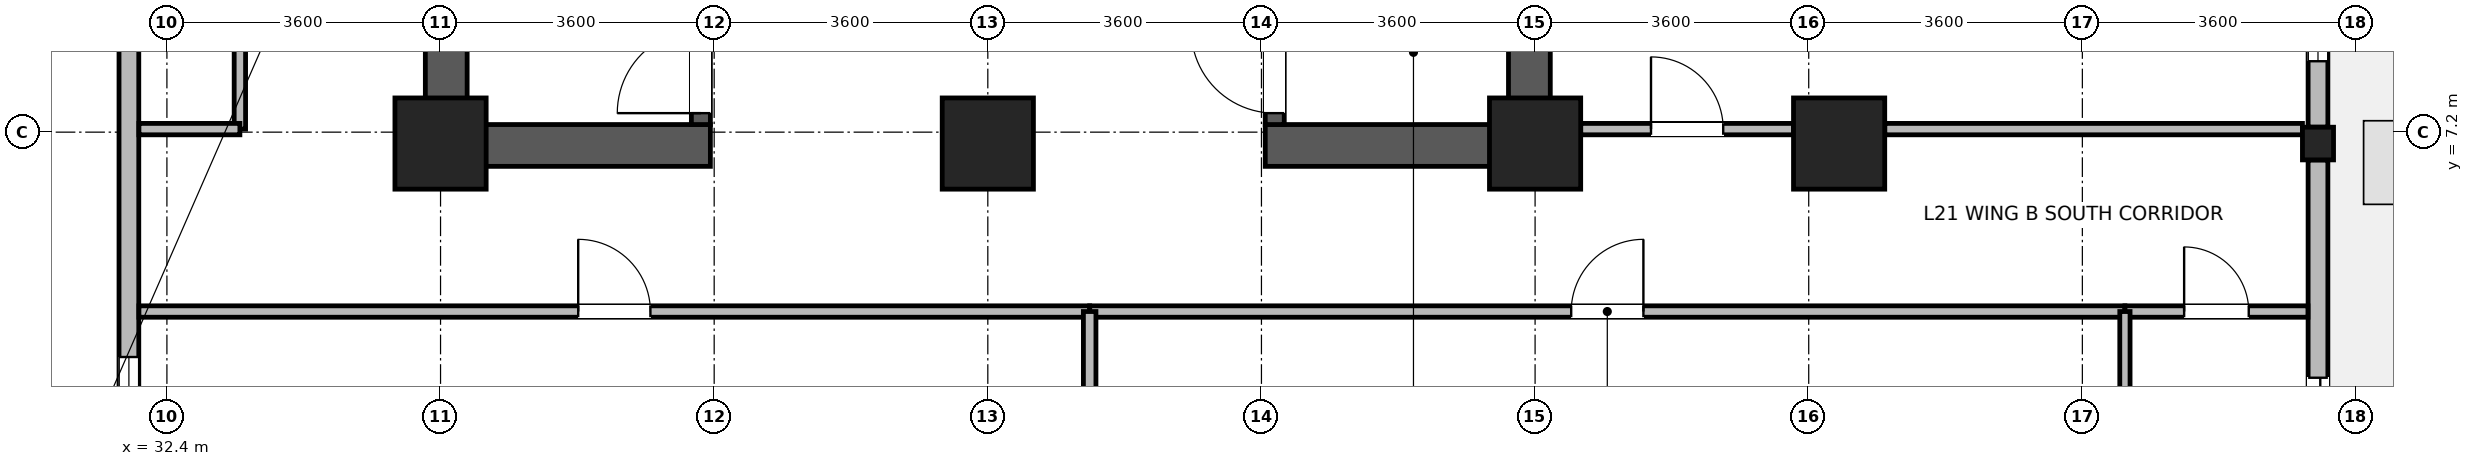
"""IFC4 building model, lengths in metres.
Left out: names, types, materials, properties, quantities, classifications, styles, units other than length and angle.
Written with IfcOpenShell. Run it as: python <this file> out.ifc"""

import sys

from ifc_helpers import new_model, si_unit, direction, frame, frame_2d, origin, origin_2d, place, context, subcontext, project, spatial, rectangle, i_section, extrude, source, transform, mapped, element, fill, save


model = new_model("IFC4")
c1 = context("Model", 3, precision=1e-05, world=origin(), true_north=direction((0.0, 1.0)))
c2 = subcontext(c1, "Body", "Model", "MODEL_VIEW")
j1 = project(units=[si_unit("LENGTHUNIT", "METRE"), si_unit("PLANEANGLEUNIT", "RADIAN")], contexts=[c1])
p1 = place(None, origin())
s1 = spatial("IfcSite", under=j1, at=p1, CompositionType="ELEMENT")
p2 = place(p1, origin())
s2 = spatial("IfcBuilding", under=s1, at=p2, CompositionType="ELEMENT")
p3 = place(p2, frame((0.0, 0.0, 86.0)))
s3 = spatial("IfcBuildingStorey", under=s2, at=p3, CompositionType="ELEMENT", Elevation=86.0)
for number, where, z_axis, x_axis in (
    (1, (36.075, 6.75, 0.0), (0.0, 0.0, 1.0), (0.0, 1.0, 0.0)),
    (2, (50.325, 6.75, 0.0), (0.0, 0.0, 1.0), (0.0, 1.0, 0.0)),
):
    element("IfcWall", number, at=place(p3, frame(where, z_axis=z_axis, x_axis=x_axis)), inside=s3, PredefinedType="SHEAR", context=c2, shape_type="SweptSolid", body=[
        extrude(rectangle(XDim=8.1, YDim=0.55, at=frame_2d((4.05, 0.0))), origin(), (0.0, 0.0, 1.0), 3.45),
    ])
for number, where, z_axis, x_axis in (
    (3, (36.35, 7.025, 0.0), (0.0, 0.0, 1.0), (1.0, 0.0, 0.0)),
    (4, (46.85, 7.025, 0.0), (0.0, 0.0, 1.0), (1.0, 0.0, 0.0)),
):
    element("IfcWall", number, at=place(p3, frame(where, z_axis=z_axis, x_axis=x_axis)), inside=s3, PredefinedType="SHEAR", context=c2, shape_type="SweptSolid", body=[
        extrude(rectangle(XDim=3.2, YDim=0.55, at=frame_2d((1.6, 0.0))), origin(), (0.0, 0.0, 1.0), 3.45),
    ])
p4 = place(p3, frame((39.425, 7.3, 0.0), z_axis=(0.0, 0.0, 1.0), x_axis=(0.0, 1.0, 0.0)))
e5 = element("IfcWall", 5, at=p4, inside=s3, PredefinedType="SHEAR", context=c2, shape_type="SweptSolid", body=[
    extrude(rectangle(XDim=7.0, YDim=0.25, at=frame_2d((3.5, 0.0))), origin(), (0.0, 0.0, 1.0), 3.45),
])
p5 = place(p4, frame((0.15, 0.0, 0.0)))
e6 = element("IfcOpeningElement", 6, at=p5, cuts=e5, PredefinedType="OPENING", context=c2, shape_type="SweptSolid", body=[
    extrude(rectangle(XDim=1.1, YDim=2.08, at=frame_2d((0.55, 1.04))), frame((0.0, 0.135, 0.0), z_axis=(0.0, -1.0, 0.0), x_axis=(1.0, 0.0, 0.0)), (0.0, 0.0, 1.0), 0.27),
])
p6 = place(p3, frame((46.975, 7.3, 0.0), z_axis=(0.0, 0.0, 1.0), x_axis=(0.0, 1.0, 0.0)))
e7 = element("IfcWall", 7, at=p6, inside=s3, PredefinedType="SHEAR", context=c2, shape_type="SweptSolid", body=[
    extrude(rectangle(XDim=7.0, YDim=0.25, at=frame_2d((3.5, 0.0))), origin(), (0.0, 0.0, 1.0), 3.45),
])
p7 = place(p6, frame((0.15, 0.0, 0.0)))
e8 = element("IfcOpeningElement", 8, at=p7, cuts=e7, PredefinedType="OPENING", context=c2, shape_type="SweptSolid", body=[
    extrude(rectangle(XDim=1.1, YDim=2.08, at=frame_2d((0.55, 1.04))), frame((0.0, 0.135, 0.0), z_axis=(0.0, -1.0, 0.0), x_axis=(1.0, 0.0, 0.0)), (0.0, 0.0, 1.0), 0.27),
])
m1 = source(origin(), c2, "Body", "SweptSolid", [
    extrude(rectangle(XDim=1.2, YDim=1.2, at=origin_2d()), origin(), (0.0, 0.0, 1.0), 3.7),
])
for number, where, z_axis, x_axis in (
    (9, (36.0, 7.05, 0.0), (0.0, 0.0, 1.0), (1.0, 0.0, 0.0)),
    (10, (43.2, 7.05, 0.0), (0.0, 0.0, 1.0), (1.0, 0.0, 0.0)),
    (11, (50.4, 7.05, 0.0), (0.0, 0.0, 1.0), (1.0, 0.0, 0.0)),
    (12, (54.4, 7.05, 0.0), (0.0, 0.0, 1.0), (1.0, 0.0, 0.0)),
):
    element("IfcColumn", number, at=place(p3, frame(where, z_axis=z_axis, x_axis=x_axis)), inside=s3, PredefinedType="COLUMN", context=c2, shape_type="MappedRepresentation", body=[
        mapped(m1, transform((0.0, 0.0, 0.0), x_axis=(1.0, 0.0, 0.0), y_axis=(0.0, 1.0, 0.0), z_axis=(0.0, 0.0, 1.0), scale=1.0)),
    ])
m2 = source(origin(), c2, "Body", "SweptSolid", [
    extrude(i_section(OverallWidth=0.409, OverallDepth=0.43, WebThickness=0.024, FlangeThickness=0.033, FilletRadius=0.015, at=origin_2d()), origin(), (0.0, 0.0, 1.0), 3.7),
])
p8 = place(p3, frame((60.7, 7.05, 0.0), z_axis=(0.0, 0.0, 1.0), x_axis=(1.0, 0.0, 0.0)))
e13 = element("IfcColumn", 13, at=p8, inside=s3, PredefinedType="COLUMN", context=c2, shape_type="MappedRepresentation", body=[
    mapped(m2, transform((0.0, 0.0, 0.0), x_axis=(1.0, 0.0, 0.0), y_axis=(0.0, 1.0, 0.0), z_axis=(0.0, 0.0, 1.0), scale=1.0)),
])
p9 = place(p3, frame((60.7, 6.834, 0.0), z_axis=(0.0, 0.0, 1.0), x_axis=(0.0, -1.0, 0.0)))
e14 = element("IfcWall", 14, at=p9, inside=s3, PredefinedType="STANDARD", context=c2, shape_type="SweptSolid", body=[
    extrude(rectangle(XDim=5.164, YDim=0.26, at=frame_2d((2.582, 0.0))), origin(), (0.0, 0.0, 1.0), 3.43),
])
p10 = place(p9, frame((2.865, 0.0, 0.0)))
e15 = element("IfcOpeningElement", 15, at=p10, cuts=e14, PredefinedType="OPENING", context=c2, shape_type="SweptSolid", body=[
    extrude(rectangle(XDim=1.5, YDim=2.15, at=frame_2d((0.75, 1.075))), frame((0.0, 0.14, 0.0), z_axis=(0.0, -1.0, 0.0), x_axis=(1.0, 0.0, 0.0)), (0.0, 0.0, 1.0), 0.28),
])
p11 = place(p3, frame((60.7, 14.334, 0.0), z_axis=(0.0, 0.0, 1.0), x_axis=(0.0, -1.0, 0.0)))
e16 = element("IfcWall", 16, at=p11, inside=s3, PredefinedType="STANDARD", context=c2, shape_type="SweptSolid", body=[
    extrude(rectangle(XDim=7.068, YDim=0.26, at=frame_2d((3.534, 0.0))), origin(), (0.0, 0.0, 1.0), 2.93),
])
p12 = place(p11, frame((0.867, 0.0, 0.85)))
e17 = element("IfcOpeningElement", 17, at=p12, cuts=e16, PredefinedType="OPENING", context=c2, shape_type="SweptSolid", body=[
    extrude(rectangle(XDim=1.8, YDim=1.85, at=frame_2d((0.9, 0.925))), frame((0.0, 0.14, 0.0), z_axis=(0.0, -1.0, 0.0), x_axis=(1.0, 0.0, 0.0)), (0.0, 0.0, 1.0), 0.28),
])
p13 = place(p11, frame((4.401, 0.0, 0.85)))
e18 = element("IfcOpeningElement", 18, at=p13, cuts=e16, PredefinedType="OPENING", context=c2, shape_type="SweptSolid", body=[
    extrude(rectangle(XDim=1.8, YDim=1.85, at=frame_2d((0.9, 0.925))), frame((0.0, 0.14, 0.0), z_axis=(0.0, -1.0, 0.0), x_axis=(1.0, 0.0, 0.0)), (0.0, 0.0, 1.0), 0.28),
])
p14 = place(p3, frame((31.9, 1.67, 0.0), z_axis=(0.0, 0.0, 1.0), x_axis=(0.0, 1.0, 0.0)))
e19 = element("IfcWall", 19, at=p14, inside=s3, PredefinedType="STANDARD", context=c2, shape_type="SweptSolid", body=[
    extrude(rectangle(XDim=20.06, YDim=0.26, at=frame_2d((10.03, 0.0))), origin(), (0.0, 0.0, 1.0), 3.43),
])
p15 = place(p14, frame((0.772, 0.0, 0.85)))
e20 = element("IfcOpeningElement", 20, at=p15, cuts=e19, PredefinedType="OPENING", context=c2, shape_type="SweptSolid", body=[
    extrude(rectangle(XDim=1.8, YDim=1.85, at=frame_2d((0.9, 0.925))), frame((0.0, 0.14, 0.0), z_axis=(0.0, -1.0, 0.0), x_axis=(1.0, 0.0, 0.0)), (0.0, 0.0, 1.0), 0.28),
])
p16 = place(p14, frame((7.458, 0.0, 0.85)))
e21 = element("IfcOpeningElement", 21, at=p16, cuts=e19, PredefinedType="OPENING", context=c2, shape_type="SweptSolid", body=[
    extrude(rectangle(XDim=1.8, YDim=1.85, at=frame_2d((0.9, 0.925))), frame((0.0, 0.14, 0.0), z_axis=(0.0, -1.0, 0.0), x_axis=(1.0, 0.0, 0.0)), (0.0, 0.0, 1.0), 0.28),
])
p17 = place(p14, frame((14.145, 0.0, 0.85)))
e22 = element("IfcOpeningElement", 22, at=p17, cuts=e19, PredefinedType="OPENING", context=c2, shape_type="SweptSolid", body=[
    extrude(rectangle(XDim=1.8, YDim=1.85, at=frame_2d((0.9, 0.925))), frame((0.0, 0.14, 0.0), z_axis=(0.0, -1.0, 0.0), x_axis=(1.0, 0.0, 0.0)), (0.0, 0.0, 1.0), 0.28),
])
p18 = place(p14, frame((17.488, 0.0, 0.85)))
e23 = element("IfcOpeningElement", 23, at=p18, cuts=e19, PredefinedType="OPENING", context=c2, shape_type="SweptSolid", body=[
    extrude(rectangle(XDim=1.8, YDim=1.85, at=frame_2d((0.9, 0.925))), frame((0.0, 0.14, 0.0), z_axis=(0.0, -1.0, 0.0), x_axis=(1.0, 0.0, 0.0)), (0.0, 0.0, 1.0), 0.28),
])
p19 = place(p3, frame((44.54, 4.84, 0.0), z_axis=(0.0, 0.0, 1.0), x_axis=(1.0, 0.0, 0.0)))
e24 = element("IfcWall", 24, at=p19, inside=s3, PredefinedType="PARTITIONING", context=c2, shape_type="SweptSolid", body=[
    extrude(rectangle(XDim=13.62, YDim=0.15, at=frame_2d((6.81, 0.0))), origin(), (0.0, 0.0, 1.0), 3.43),
])
p20 = place(p19, frame((6.335, 0.0, 0.0)))
e25 = element("IfcOpeningElement", 25, at=p20, cuts=e24, PredefinedType="OPENING", context=c2, shape_type="SweptSolid", body=[
    extrude(rectangle(XDim=0.95, YDim=2.1, at=frame_2d((0.475, 1.05))), frame((0.0, 0.085, 0.0), z_axis=(0.0, -1.0, 0.0), x_axis=(1.0, 0.0, 0.0)), (0.0, 0.0, 1.0), 0.17),
])
p21 = place(p3, frame((32.032, 4.84, 0.0), z_axis=(0.0, 0.0, 1.0), x_axis=(1.0, 0.0, 0.0)))
e26 = element("IfcWall", 26, at=p21, inside=s3, PredefinedType="PARTITIONING", context=c2, shape_type="SweptSolid", body=[
    extrude(rectangle(XDim=12.508, YDim=0.15, at=frame_2d((6.254, 0.0))), origin(), (0.0, 0.0, 1.0), 3.43),
])
p22 = place(p21, frame((5.779, 0.0, 0.0)))
e27 = element("IfcOpeningElement", 27, at=p22, cuts=e26, PredefinedType="OPENING", context=c2, shape_type="SweptSolid", body=[
    extrude(rectangle(XDim=0.95, YDim=2.1, at=frame_2d((0.475, 1.05))), frame((0.0, 0.085, 0.0), z_axis=(0.0, -1.0, 0.0), x_axis=(1.0, 0.0, 0.0)), (0.0, 0.0, 1.0), 0.17),
])
p23 = place(p3, frame((51.0, 7.24, 0.0), z_axis=(0.0, 0.0, 1.0), x_axis=(1.0, 0.0, 0.0)))
e28 = element("IfcWall", 28, at=p23, inside=s3, PredefinedType="PARTITIONING", context=c2, shape_type="SweptSolid", body=[
    extrude(rectangle(XDim=2.8, YDim=0.15, at=frame_2d((1.4, 0.0))), origin(), (0.0, 0.0, 1.0), 2.78),
])
p24 = place(p23, frame((0.925, 0.0, 0.0)))
e29 = element("IfcOpeningElement", 29, at=p24, cuts=e28, PredefinedType="OPENING", context=c2, shape_type="SweptSolid", body=[
    extrude(rectangle(XDim=0.95, YDim=2.1, at=frame_2d((0.475, 1.05))), frame((0.0, 0.085, 0.0), z_axis=(0.0, -1.0, 0.0), x_axis=(1.0, 0.0, 0.0)), (0.0, 0.0, 1.0), 0.17),
])
p25 = place(p3, frame((55.0, 7.24, 0.0), z_axis=(0.0, 0.0, 1.0), x_axis=(1.0, 0.0, 0.0)))
e30 = element("IfcWall", 30, at=p25, inside=s3, PredefinedType="PARTITIONING", context=c2, shape_type="SweptSolid", body=[
    extrude(rectangle(XDim=5.496, YDim=0.15, at=frame_2d((2.748, 0.0))), origin(), (0.0, 0.0, 1.0), 2.78),
])
p26 = place(p3, frame((33.36, 7.24, 0.0), z_axis=(0.0, 0.0, 1.0), x_axis=(0.0, 1.0, 0.0)))
e31 = element("IfcWall", 31, at=p26, inside=s3, PredefinedType="PARTITIONING", context=c2, shape_type="SweptSolid", body=[
    extrude(rectangle(XDim=7.26, YDim=0.15, at=frame_2d((3.63, 0.0))), origin(), (0.0, 0.0, 1.0), 3.43),
])
p27 = place(p26, frame((2.98, 0.0, 0.0)))
e32 = element("IfcOpeningElement", 32, at=p27, cuts=e31, PredefinedType="OPENING", context=c2, shape_type="SweptSolid", body=[
    extrude(rectangle(XDim=1.3, YDim=2.12, at=frame_2d((0.65, 1.06))), frame((0.0, 0.085, 0.0), z_axis=(0.0, -1.0, 0.0), x_axis=(1.0, 0.0, 0.0)), (0.0, 0.0, 1.0), 0.17),
])
p28 = place(p3, frame((58.16, 4.84, 0.0), z_axis=(0.0, 0.0, 1.0), x_axis=(1.0, 0.0, 0.0)))
e33 = element("IfcWall", 33, at=p28, inside=s3, PredefinedType="PARTITIONING", context=c2, shape_type="SweptSolid", body=[
    extrude(rectangle(XDim=2.408, YDim=0.15, at=frame_2d((1.204, 0.0))), origin(), (0.0, 0.0, 1.0), 3.43),
])
p29 = place(p28, frame((0.779, 0.0, 0.0)))
e34 = element("IfcOpeningElement", 34, at=p29, cuts=e33, PredefinedType="OPENING", context=c2, shape_type="SweptSolid", body=[
    extrude(rectangle(XDim=0.85, YDim=2.04, at=frame_2d((0.425, 1.02))), frame((0.0, 0.085, 0.0), z_axis=(0.0, -1.0, 0.0), x_axis=(1.0, 0.0, 0.0)), (0.0, 0.0, 1.0), 0.17),
])
p30 = place(p3, frame((32.032, 7.24, 0.0), z_axis=(0.0, 0.0, 1.0), x_axis=(1.0, 0.0, 0.0)))
e35 = element("IfcWall", 35, at=p30, inside=s3, PredefinedType="PARTITIONING", context=c2, shape_type="SweptSolid", body=[
    extrude(rectangle(XDim=1.328, YDim=0.15, at=frame_2d((0.664, 0.0))), origin(), (0.0, 0.0, 1.0), 3.43),
])
p31 = place(p3, frame((44.54, 1.932, 0.0), z_axis=(0.0, 0.0, 1.0), x_axis=(0.0, 1.0, 0.0)))
e36 = element("IfcWall", 36, at=p31, inside=s3, PredefinedType="PARTITIONING", context=c2, shape_type="SweptSolid", body=[
    extrude(rectangle(XDim=2.908, YDim=0.165, at=frame_2d((1.454, 0.0))), origin(), (0.0, 0.0, 1.0), 3.43),
])
p32 = place(p3, frame((58.16, 1.932, 0.0), z_axis=(0.0, 0.0, 1.0), x_axis=(0.0, 1.0, 0.0)))
e37 = element("IfcWall", 37, at=p32, inside=s3, PredefinedType="PARTITIONING", context=c2, shape_type="SweptSolid", body=[
    extrude(rectangle(XDim=2.908, YDim=0.135, at=frame_2d((1.454, 0.0))), origin(), (0.0, 0.0, 1.0), 3.43),
])
p33 = place(p10, origin())
e38 = element("IfcDoor", 38, at=p33, inside=s3, OperationType="SLIDING_TO_LEFT", PredefinedType="DOOR", context=c2, shape_type="SweptSolid", body=[
    extrude(rectangle(XDim=1.5, YDim=2.15, at=frame_2d((0.75, 1.075))), frame((0.0, 0.025, 0.0), z_axis=(0.0, -1.0, 0.0), x_axis=(1.0, 0.0, 0.0)), (0.0, 0.0, 1.0), 0.05),
])
fill(e15, e38)
p34 = place(p13, origin())
e39 = element("IfcWindow", 39, at=p34, inside=s3, PartitioningType="SINGLE_PANEL", PredefinedType="WINDOW", context=c2, shape_type="SweptSolid", body=[
    extrude(rectangle(XDim=1.8, YDim=1.85, at=frame_2d((0.9, 0.925))), frame((0.0, 0.03, 0.0), z_axis=(0.0, -1.0, 0.0), x_axis=(1.0, 0.0, 0.0)), (0.0, 0.0, 1.0), 0.06),
])
fill(e18, e39)
p35 = place(p15, origin())
e40 = element("IfcWindow", 40, at=p35, inside=s3, PartitioningType="SINGLE_PANEL", PredefinedType="WINDOW", context=c2, shape_type="SweptSolid", body=[
    extrude(rectangle(XDim=1.8, YDim=1.85, at=frame_2d((0.9, 0.925))), frame((0.0, 0.03, 0.0), z_axis=(0.0, -1.0, 0.0), x_axis=(1.0, 0.0, 0.0)), (0.0, 0.0, 1.0), 0.06),
])
fill(e20, e40)
p36 = place(p5, origin())
e41 = element("IfcDoor", 41, at=p36, inside=s3, OperationType="SINGLE_SWING_LEFT", PredefinedType="DOOR", context=c2, shape_type="SweptSolid", body=[
    extrude(rectangle(XDim=1.1, YDim=2.08, at=frame_2d((0.55, 1.04))), frame((0.0, 0.025, 0.0), z_axis=(0.0, -1.0, 0.0), x_axis=(1.0, 0.0, 0.0)), (0.0, 0.0, 1.0), 0.05),
])
fill(e6, e41)
p37 = place(p7, origin())
e42 = element("IfcDoor", 42, at=p37, inside=s3, OperationType="SINGLE_SWING_RIGHT", PredefinedType="DOOR", context=c2, shape_type="SweptSolid", body=[
    extrude(rectangle(XDim=1.1, YDim=2.08, at=frame_2d((0.55, 1.04))), frame((0.0, 0.025, 0.0), z_axis=(0.0, -1.0, 0.0), x_axis=(1.0, 0.0, 0.0)), (0.0, 0.0, 1.0), 0.05),
])
fill(e8, e42)
p38 = place(p20, origin())
e43 = element("IfcDoor", 43, at=p38, inside=s3, OperationType="SINGLE_SWING_RIGHT", PredefinedType="DOOR", context=c2, shape_type="SweptSolid", body=[
    extrude(rectangle(XDim=0.95, YDim=2.1, at=frame_2d((0.475, 1.05))), frame((0.0, 0.025, 0.0), z_axis=(0.0, -1.0, 0.0), x_axis=(1.0, 0.0, 0.0)), (0.0, 0.0, 1.0), 0.05),
])
fill(e25, e43)
p39 = place(p22, origin())
e44 = element("IfcDoor", 44, at=p39, inside=s3, OperationType="SINGLE_SWING_LEFT", PredefinedType="DOOR", context=c2, shape_type="SweptSolid", body=[
    extrude(rectangle(XDim=0.95, YDim=2.1, at=frame_2d((0.475, 1.05))), frame((0.0, 0.025, 0.0), z_axis=(0.0, -1.0, 0.0), x_axis=(1.0, 0.0, 0.0)), (0.0, 0.0, 1.0), 0.05),
])
fill(e27, e44)
p40 = place(p24, origin())
e45 = element("IfcDoor", 45, at=p40, inside=s3, OperationType="SINGLE_SWING_LEFT", PredefinedType="DOOR", context=c2, shape_type="SweptSolid", body=[
    extrude(rectangle(XDim=0.95, YDim=2.1, at=frame_2d((0.475, 1.05))), frame((0.0, 0.025, 0.0), z_axis=(0.0, -1.0, 0.0), x_axis=(1.0, 0.0, 0.0)), (0.0, 0.0, 1.0), 0.05),
])
fill(e29, e45)
p41 = place(p29, origin())
e46 = element("IfcDoor", 46, at=p41, inside=s3, OperationType="SINGLE_SWING_LEFT", PredefinedType="DOOR", context=c2, shape_type="SweptSolid", body=[
    extrude(rectangle(XDim=0.85, YDim=2.04, at=frame_2d((0.425, 1.02))), frame((0.0, 0.025, 0.0), z_axis=(0.0, -1.0, 0.0), x_axis=(1.0, 0.0, 0.0)), (0.0, 0.0, 1.0), 0.05),
])
fill(e34, e46)
save(model, sys.argv[1])
